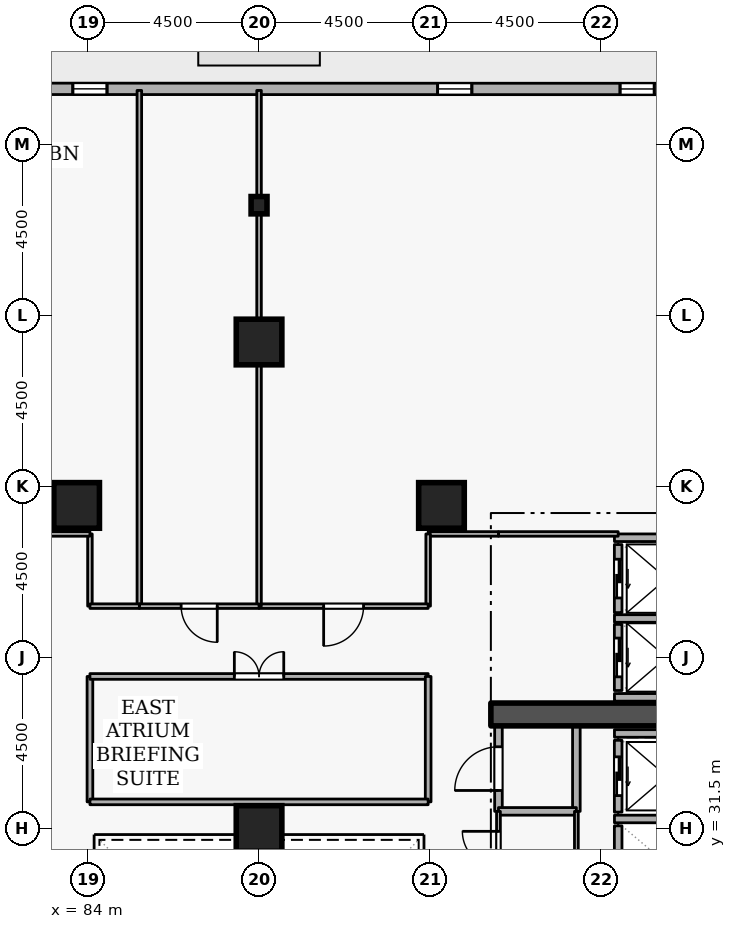
"""IFC4 building model, lengths in metres.
Left out: names, types, materials, properties, quantities, classifications, styles, units other than length and angle.
Written with IfcOpenShell. Run it as: python <this file> out.ifc"""

import sys

from ifc_helpers import new_model, si_unit, direction, frame, frame_2d, origin, origin_2d, place, context, subcontext, project, spatial, rectangle, i_section, extrude, element, fill, save


model = new_model("IFC4")
c1 = context("Model", 3, precision=1e-05, world=origin(), true_north=direction((0.0, 1.0)))
c2 = subcontext(c1, "Body", "Model", "MODEL_VIEW")
j1 = project(units=[si_unit("LENGTHUNIT", "METRE"), si_unit("PLANEANGLEUNIT", "RADIAN")], contexts=[c1])
p1 = place(None, origin())
s1 = spatial("IfcSite", under=j1, at=p1, CompositionType="ELEMENT")
p2 = place(p1, origin())
s2 = spatial("IfcBuilding", under=s1, at=p2, CompositionType="ELEMENT")
p3 = place(p2, frame((0.0, 0.0, 90.9)))
s3 = spatial("IfcBuildingStorey", under=s2, at=p3, CompositionType="ELEMENT", Elevation=90.9)
p4 = place(p3, frame((94.6, 34.5, 0.0), z_axis=(0.0, 0.0, 1.0), x_axis=(1.0, 0.0, 0.0)))
e1 = element("IfcWall", 1, at=p4, inside=s3, PredefinedType="SHEAR", context=c2, shape_type="SweptSolid", body=[
    extrude(rectangle(XDim=5.7, YDim=0.6, at=frame_2d((2.85, 0.0))), origin(), (0.0, 0.0, 1.0), 3.6),
])
for number, where, z_axis, x_axis in (
    (2, (88.5, 44.3, 0.0), (0.0, 0.0, 1.0), (1.0, 0.0, 0.0)),
    (3, (93.3, 40.0, 0.0), (0.0, 0.0, 1.0), (1.0, 0.0, 0.0)),
    (4, (83.7, 40.0, 0.0), (0.0, 0.0, 1.0), (1.0, 0.0, 0.0)),
    (5, (88.5, 31.5, 0.0), (0.0, 0.0, 1.0), (1.0, 0.0, 0.0)),
):
    element("IfcColumn", number, at=place(p3, frame(where, z_axis=z_axis, x_axis=x_axis)), inside=s3, PredefinedType="COLUMN", context=c2, shape_type="SweptSolid", body=[
        extrude(rectangle(XDim=1.2, YDim=1.2, at=origin_2d()), origin(), (0.0, 0.0, 1.0), 3.6),
    ])
p5 = place(p3, frame((88.5, 47.9, 0.0), z_axis=(0.0, 0.0, 1.0), x_axis=(1.0, 0.0, 0.0)))
e6 = element("IfcColumn", 6, at=p5, inside=s3, PredefinedType="COLUMN", context=c2, shape_type="SweptSolid", body=[
    extrude(i_section(OverallWidth=0.418, OverallDepth=0.456, WebThickness=0.042, FlangeThickness=0.067, FilletRadius=0.015, at=origin_2d()), origin(), (0.0, 0.0, 1.0), 3.6),
])
p6 = place(p3, frame((101.599, 50.957, 0.0), z_axis=(0.0, 0.0, 1.0), x_axis=(-0.99999997744, 0.000212414941, 0.0)))
e7 = element("IfcWall", 7, at=p6, inside=s3, PredefinedType="STANDARD", context=c2, shape_type="SweptSolid", body=[
    extrude(rectangle(XDim=34.481, YDim=0.3, at=frame_2d((17.24, 0.0))), origin(), (0.0, 0.0, 1.0), 2.7),
])
p7 = place(p6, frame((19.04, 0.0, 0.0)))
e8 = element("IfcOpeningElement", 8, at=p7, cuts=e7, PredefinedType="OPENING", context=c2, shape_type="SweptSolid", body=[
    extrude(rectangle(XDim=1.0, YDim=2.08, at=frame_2d((0.5, 1.04))), frame((0.0, 0.16, 0.0), z_axis=(0.0, -1.0, 0.0), x_axis=(1.0, 0.0, 0.0)), (0.0, 0.0, 1.0), 0.32),
])
p8 = place(p6, frame((2.7, 0.0, 0.72)))
e9 = element("IfcOpeningElement", 9, at=p8, cuts=e7, PredefinedType="OPENING", context=c2, shape_type="SweptSolid", body=[
    extrude(rectangle(XDim=0.9, YDim=1.75, at=frame_2d((0.45, 0.875))), frame((0.0, 0.16, 0.0), z_axis=(0.0, -1.0, 0.0), x_axis=(1.0, 0.0, 0.0)), (0.0, 0.0, 1.0), 0.32),
])
p9 = place(p6, frame((7.5, 0.0, 0.72)))
e10 = element("IfcOpeningElement", 10, at=p9, cuts=e7, PredefinedType="OPENING", context=c2, shape_type="SweptSolid", body=[
    extrude(rectangle(XDim=0.9, YDim=1.75, at=frame_2d((0.45, 0.875))), frame((0.0, 0.16, 0.0), z_axis=(0.0, -1.0, 0.0), x_axis=(1.0, 0.0, 0.0)), (0.0, 0.0, 1.0), 0.32),
])
p10 = place(p6, frame((17.1, 0.0, 0.72)))
e11 = element("IfcOpeningElement", 11, at=p10, cuts=e7, PredefinedType="OPENING", context=c2, shape_type="SweptSolid", body=[
    extrude(rectangle(XDim=0.9, YDim=1.75, at=frame_2d((0.45, 0.875))), frame((0.0, 0.16, 0.0), z_axis=(0.0, -1.0, 0.0), x_axis=(1.0, 0.0, 0.0)), (0.0, 0.0, 1.0), 0.32),
])
p11 = place(p6, frame((21.9, 0.0, 0.72)))
e12 = element("IfcOpeningElement", 12, at=p11, cuts=e7, PredefinedType="OPENING", context=c2, shape_type="SweptSolid", body=[
    extrude(rectangle(XDim=0.9, YDim=1.75, at=frame_2d((0.45, 0.875))), frame((0.0, 0.16, 0.0), z_axis=(0.0, -1.0, 0.0), x_axis=(1.0, 0.0, 0.0)), (0.0, 0.0, 1.0), 0.32),
])
p12 = place(p6, frame((26.7, 0.0, 0.72)))
e13 = element("IfcOpeningElement", 13, at=p12, cuts=e7, PredefinedType="OPENING", context=c2, shape_type="SweptSolid", body=[
    extrude(rectangle(XDim=0.9, YDim=1.75, at=frame_2d((0.45, 0.875))), frame((0.0, 0.16, 0.0), z_axis=(0.0, -1.0, 0.0), x_axis=(1.0, 0.0, 0.0)), (0.0, 0.0, 1.0), 0.32),
])
p13 = place(p6, frame((31.5, 0.0, 0.72)))
e14 = element("IfcOpeningElement", 14, at=p13, cuts=e7, PredefinedType="OPENING", context=c2, shape_type="SweptSolid", body=[
    extrude(rectangle(XDim=0.9, YDim=1.75, at=frame_2d((0.45, 0.875))), frame((0.0, 0.16, 0.0), z_axis=(0.0, -1.0, 0.0), x_axis=(1.0, 0.0, 0.0)), (0.0, 0.0, 1.0), 0.32),
])
p14 = place(p3, frame((97.95, 31.57, 0.0), z_axis=(0.0, 0.0, 1.0), x_axis=(0.0, -1.0, 0.0)))
e15 = element("IfcWall", 15, at=p14, inside=s3, PredefinedType="STANDARD", context=c2, shape_type="SweptSolid", body=[
    extrude(rectangle(XDim=1.99, YDim=0.2, at=frame_2d((0.995, 0.0))), origin(), (0.0, 0.0, 1.0), 3.34),
])
p15 = place(p3, frame((97.95, 33.82, 0.0), z_axis=(0.0, 0.0, 1.0), x_axis=(0.0, -1.0, 0.0)))
e16 = element("IfcWall", 16, at=p15, inside=s3, PredefinedType="STANDARD", context=c2, shape_type="SweptSolid", body=[
    extrude(rectangle(XDim=1.89, YDim=0.2, at=frame_2d((0.945, 0.0))), origin(), (0.0, 0.0, 1.0), 3.34),
])
p16 = place(p15, frame((0.435, 0.0, 0.0)))
e17 = element("IfcOpeningElement", 17, at=p16, cuts=e16, PredefinedType="OPENING", context=c2, shape_type="SweptSolid", body=[
    extrude(rectangle(XDim=1.02, YDim=2.06, at=frame_2d((0.51, 1.03))), frame((0.0, 0.11, 0.0), z_axis=(0.0, -1.0, 0.0), x_axis=(1.0, 0.0, 0.0)), (0.0, 0.0, 1.0), 0.22),
])
p17 = place(p3, frame((97.95, 36.87, 0.0), z_axis=(0.0, 0.0, 1.0), x_axis=(0.0, -1.0, 0.0)))
e18 = element("IfcWall", 18, at=p17, inside=s3, PredefinedType="STANDARD", context=c2, shape_type="SweptSolid", body=[
    extrude(rectangle(XDim=1.74, YDim=0.2, at=frame_2d((0.87, 0.0))), origin(), (0.0, 0.0, 1.0), 3.34),
])
p18 = place(p17, frame((0.36, 0.0, 0.0)))
e19 = element("IfcOpeningElement", 19, at=p18, cuts=e18, PredefinedType="OPENING", context=c2, shape_type="SweptSolid", body=[
    extrude(rectangle(XDim=1.02, YDim=2.06, at=frame_2d((0.51, 1.03))), frame((0.0, 0.11, 0.0), z_axis=(0.0, -1.0, 0.0), x_axis=(1.0, 0.0, 0.0)), (0.0, 0.0, 1.0), 0.22),
])
p19 = place(p3, frame((97.95, 38.97, 0.0), z_axis=(0.0, 0.0, 1.0), x_axis=(0.0, -1.0, 0.0)))
e20 = element("IfcWall", 20, at=p19, inside=s3, PredefinedType="STANDARD", context=c2, shape_type="SweptSolid", body=[
    extrude(rectangle(XDim=1.79, YDim=0.2, at=frame_2d((0.895, 0.0))), origin(), (0.0, 0.0, 1.0), 3.34),
])
p20 = place(p19, frame((0.385, 0.0, 0.0)))
e21 = element("IfcOpeningElement", 21, at=p20, cuts=e20, PredefinedType="OPENING", context=c2, shape_type="SweptSolid", body=[
    extrude(rectangle(XDim=1.02, YDim=2.06, at=frame_2d((0.51, 1.03))), frame((0.0, 0.11, 0.0), z_axis=(0.0, -1.0, 0.0), x_axis=(1.0, 0.0, 0.0)), (0.0, 0.0, 1.0), 0.22),
])
for number, where, z_axis, x_axis in (
    (22, (97.852, 31.75, 0.0), (0.0, 0.0, 1.0), (1.0, 0.0, 0.0)),
    (23, (97.852, 34.0, 0.0), (0.0, 0.0, 1.0), (1.0, 0.0, 0.0)),
):
    element("IfcWall", number, at=place(p3, frame(where, z_axis=z_axis, x_axis=x_axis)), inside=s3, PredefinedType="STANDARD", context=c2, shape_type="SweptSolid", body=[
        extrude(rectangle(XDim=2.436, YDim=0.2, at=frame_2d((1.218, 0.0))), origin(), (0.0, 0.0, 1.0), 3.34),
    ])
for number, where, z_axis, x_axis in (
    (24, (97.852, 37.025, 0.0), (0.0, 0.0, 1.0), (1.0, 0.0, 0.0)),
    (25, (97.852, 34.95, 0.0), (0.0, 0.0, 1.0), (1.0, 0.0, 0.0)),
):
    element("IfcWall", number, at=place(p3, frame(where, z_axis=z_axis, x_axis=x_axis)), inside=s3, PredefinedType="STANDARD", context=c2, shape_type="SweptSolid", body=[
        extrude(rectangle(XDim=2.746, YDim=0.2, at=frame_2d((1.373, 0.0))), origin(), (0.0, 0.0, 1.0), 3.34),
    ])
p21 = place(p3, frame((97.852, 39.15, 0.0), z_axis=(0.0, 0.0, 1.0), x_axis=(1.0, 0.0, 0.0)))
e26 = element("IfcWall", 26, at=p21, inside=s3, PredefinedType="STANDARD", context=c2, shape_type="SweptSolid", body=[
    extrude(rectangle(XDim=2.636, YDim=0.2, at=frame_2d((1.318, 0.0))), origin(), (0.0, 0.0, 1.0), 3.34),
])
p22 = place(p3, frame((94.8, 31.95, 0.0), z_axis=(0.0, 0.0, 1.0), x_axis=(0.0, 1.0, 0.0)))
e27 = element("IfcWall", 27, at=p22, inside=s3, PredefinedType="STANDARD", context=c2, shape_type="SweptSolid", body=[
    extrude(rectangle(XDim=2.25, YDim=0.2, at=frame_2d((1.125, 0.0))), origin(), (0.0, 0.0, 1.0), 3.34),
])
p23 = place(p22, frame((0.55, 0.0, 0.0)))
e28 = element("IfcOpeningElement", 28, at=p23, cuts=e27, PredefinedType="OPENING", context=c2, shape_type="SweptSolid", body=[
    extrude(rectangle(XDim=1.15, YDim=2.1, at=frame_2d((0.575, 1.05))), frame((0.0, 0.11, 0.0), z_axis=(0.0, -1.0, 0.0), x_axis=(1.0, 0.0, 0.0)), (0.0, 0.0, 1.0), 0.22),
])
p24 = place(p3, frame((96.85, 34.2, 0.0), z_axis=(0.0, 0.0, 1.0), x_axis=(0.0, -1.0, 0.0)))
e29 = element("IfcWall", 29, at=p24, inside=s3, PredefinedType="STANDARD", context=c2, shape_type="SweptSolid", body=[
    extrude(rectangle(XDim=2.25, YDim=0.2, at=frame_2d((1.125, 0.0))), origin(), (0.0, 0.0, 1.0), 3.34),
])
p25 = place(p3, frame((96.85, 31.95, 0.0), z_axis=(0.0, 0.0, 1.0), x_axis=(-1.0, 0.0, 0.0)))
e30 = element("IfcWall", 30, at=p25, inside=s3, PredefinedType="STANDARD", context=c2, shape_type="SweptSolid", body=[
    extrude(rectangle(XDim=2.05, YDim=0.2, at=frame_2d((1.025, 0.0))), origin(), (0.0, 0.0, 1.0), 3.34),
])
p26 = place(p3, frame((94.8, 29.95, 0.0), z_axis=(0.0, 0.0, 1.0), x_axis=(0.0, 1.0, 0.0)))
e31 = element("IfcWall", 31, at=p26, inside=s3, PredefinedType="PARTITIONING", context=c2, shape_type="SweptSolid", body=[
    extrude(rectangle(XDim=2.0, YDim=0.1, at=frame_2d((1.0, 0.0))), origin(), (0.0, 0.0, 1.0), 3.34),
])
p27 = place(p26, frame((0.525, 0.0, 0.0)))
e32 = element("IfcOpeningElement", 32, at=p27, cuts=e31, PredefinedType="OPENING", context=c2, shape_type="SweptSolid", body=[
    extrude(rectangle(XDim=0.95, YDim=2.1, at=frame_2d((0.475, 1.05))), frame((0.0, 0.06, 0.0), z_axis=(0.0, -1.0, 0.0), x_axis=(1.0, 0.0, 0.0)), (0.0, 0.0, 1.0), 0.12),
])
p28 = place(p3, frame((96.85, 31.95, 0.0), z_axis=(0.0, 0.0, 1.0), x_axis=(0.0, -1.0, 0.0)))
e33 = element("IfcWall", 33, at=p28, inside=s3, PredefinedType="PARTITIONING", context=c2, shape_type="SweptSolid", body=[
    extrude(rectangle(XDim=2.0, YDim=0.1, at=frame_2d((1.0, 0.0))), origin(), (0.0, 0.0, 1.0), 3.34),
])
p29 = place(p3, frame((97.95, 39.25, 0.0), z_axis=(0.0, 0.0, 1.0), x_axis=(-1.0, 0.0, 0.0)))
e34 = element("IfcWall", 34, at=p29, inside=s3, PredefinedType="PARTITIONING", context=c2, shape_type="SweptSolid", body=[
    extrude(rectangle(XDim=3.15, YDim=0.12, at=frame_2d((1.575, 0.0))), origin(), (0.0, 0.0, 1.0), 3.34),
])
p30 = place(p3, frame((94.8, 39.25, 0.0), z_axis=(0.0, 0.0, 1.0), x_axis=(-1.0, 0.0, 0.0)))
e35 = element("IfcWall", 35, at=p30, inside=s3, PredefinedType="PARTITIONING", context=c2, shape_type="SweptSolid", body=[
    extrude(rectangle(XDim=1.85, YDim=0.12, at=frame_2d((0.925, 0.0))), origin(), (0.0, 0.0, 1.0), 3.34),
])
p31 = place(p3, frame((92.95, 39.25, 0.0), z_axis=(0.0, 0.0, 1.0), x_axis=(0.0, -1.0, 0.0)))
e36 = element("IfcWall", 36, at=p31, inside=s3, PredefinedType="PARTITIONING", context=c2, shape_type="SweptSolid", body=[
    extrude(rectangle(XDim=1.9, YDim=0.12, at=frame_2d((0.95, 0.0))), origin(), (0.0, 0.0, 1.0), 3.34),
])
p32 = place(p3, frame((92.95, 37.35, 0.0), z_axis=(0.0, 0.0, 1.0), x_axis=(-1.0, 0.0, 0.0)))
e37 = element("IfcWall", 37, at=p32, inside=s3, PredefinedType="PARTITIONING", context=c2, shape_type="SweptSolid", body=[
    extrude(rectangle(XDim=4.45, YDim=0.12, at=frame_2d((2.225, 0.0))), origin(), (0.0, 0.0, 1.0), 3.34),
])
p33 = place(p32, frame((1.7, 0.0, 0.0)))
e38 = element("IfcOpeningElement", 38, at=p33, cuts=e37, PredefinedType="OPENING", context=c2, shape_type="SweptSolid", body=[
    extrude(rectangle(XDim=1.05, YDim=2.1, at=frame_2d((0.525, 1.05))), frame((0.0, 0.07, 0.0), z_axis=(0.0, -1.0, 0.0), x_axis=(1.0, 0.0, 0.0)), (0.0, 0.0, 1.0), 0.14),
])
p34 = place(p3, frame((88.5, 37.35, 0.0), z_axis=(0.0, 0.0, 1.0), x_axis=(0.0, 1.0, 0.0)))
e39 = element("IfcWall", 39, at=p34, inside=s3, PredefinedType="PARTITIONING", context=c2, shape_type="SweptSolid", body=[
    extrude(rectangle(XDim=13.57, YDim=0.12, at=frame_2d((6.785, 0.0))), origin(), (0.0, 0.0, 1.0), 2.932),
])
p35 = place(p3, frame((85.35, 37.35, 0.0), z_axis=(0.0, 0.0, 1.0), x_axis=(0.0, 1.0, 0.0)))
e40 = element("IfcWall", 40, at=p35, inside=s3, PredefinedType="PARTITIONING", context=c2, shape_type="SweptSolid", body=[
    extrude(rectangle(XDim=13.57, YDim=0.12, at=frame_2d((6.785, 0.0))), origin(), (0.0, 0.0, 1.0), 3.34),
])
p36 = place(p3, frame((88.5, 37.35, 0.0), z_axis=(0.0, 0.0, 1.0), x_axis=(-1.0, 0.0, 0.0)))
e41 = element("IfcWall", 41, at=p36, inside=s3, PredefinedType="PARTITIONING", context=c2, shape_type="SweptSolid", body=[
    extrude(rectangle(XDim=3.15, YDim=0.12, at=frame_2d((1.575, 0.0))), origin(), (0.0, 0.0, 1.0), 3.34),
])
p37 = place(p36, frame((1.1, 0.0, 0.0)))
e42 = element("IfcOpeningElement", 42, at=p37, cuts=e41, PredefinedType="OPENING", context=c2, shape_type="SweptSolid", body=[
    extrude(rectangle(XDim=0.95, YDim=2.1, at=frame_2d((0.475, 1.05))), frame((0.0, 0.07, 0.0), z_axis=(0.0, -1.0, 0.0), x_axis=(1.0, 0.0, 0.0)), (0.0, 0.0, 1.0), 0.14),
])
p38 = place(p3, frame((84.05, 37.35, 0.0), z_axis=(0.0, 0.0, 1.0), x_axis=(0.0, 1.0, 0.0)))
e43 = element("IfcWall", 43, at=p38, inside=s3, PredefinedType="PARTITIONING", context=c2, shape_type="SweptSolid", body=[
    extrude(rectangle(XDim=1.9, YDim=0.12, at=frame_2d((0.95, 0.0))), origin(), (0.0, 0.0, 1.0), 3.34),
])
p39 = place(p3, frame((84.05, 39.25, 0.0), z_axis=(0.0, 0.0, 1.0), x_axis=(-1.0, 0.0, 0.0)))
e44 = element("IfcWall", 44, at=p39, inside=s3, PredefinedType="PARTITIONING", context=c2, shape_type="SweptSolid", body=[
    extrude(rectangle(XDim=1.85, YDim=0.12, at=frame_2d((0.925, 0.0))), origin(), (0.0, 0.0, 1.0), 3.34),
])
p40 = place(p3, frame((85.35, 37.35, 0.0), z_axis=(0.0, 0.0, 1.0), x_axis=(-1.0, 0.0, 0.0)))
e45 = element("IfcWall", 45, at=p40, inside=s3, PredefinedType="PARTITIONING", context=c2, shape_type="SweptSolid", body=[
    extrude(rectangle(XDim=1.3, YDim=0.12, at=frame_2d((0.65, 0.0))), origin(), (0.0, 0.0, 1.0), 3.34),
])
p41 = place(p3, frame((84.05, 32.2, 0.0), z_axis=(0.0, 0.0, 1.0), x_axis=(0.0, 1.0, 0.0)))
e46 = element("IfcWall", 46, at=p41, inside=s3, PredefinedType="PARTITIONING", context=c2, shape_type="SweptSolid", body=[
    extrude(rectangle(XDim=3.3, YDim=0.15, at=frame_2d((1.65, 0.0))), origin(), (0.0, 0.0, 1.0), 3.34),
])
p42 = place(p3, frame((84.05, 35.5, 0.0), z_axis=(0.0, 0.0, 1.0), x_axis=(1.0, 0.0, 0.0)))
e47 = element("IfcWall", 47, at=p42, inside=s3, PredefinedType="PARTITIONING", context=c2, shape_type="SweptSolid", body=[
    extrude(rectangle(XDim=8.9, YDim=0.15, at=frame_2d((4.45, 0.0))), origin(), (0.0, 0.0, 1.0), 3.34),
])
p43 = place(p42, frame((3.8, 0.0, 0.0)))
e48 = element("IfcOpeningElement", 48, at=p43, cuts=e47, PredefinedType="OPENING", context=c2, shape_type="SweptSolid", body=[
    extrude(rectangle(XDim=1.3, YDim=2.12, at=frame_2d((0.65, 1.06))), frame((0.0, 0.085, 0.0), z_axis=(0.0, -1.0, 0.0), x_axis=(1.0, 0.0, 0.0)), (0.0, 0.0, 1.0), 0.17),
])
p44 = place(p3, frame((92.95, 35.5, 0.0), z_axis=(0.0, 0.0, 1.0), x_axis=(0.0, -1.0, 0.0)))
e49 = element("IfcWall", 49, at=p44, inside=s3, PredefinedType="PARTITIONING", context=c2, shape_type="SweptSolid", body=[
    extrude(rectangle(XDim=3.3, YDim=0.15, at=frame_2d((1.65, 0.0))), origin(), (0.0, 0.0, 1.0), 3.34),
])
p45 = place(p3, frame((92.95, 32.2, 0.0), z_axis=(0.0, 0.0, 1.0), x_axis=(-1.0, 0.0, 0.0)))
e50 = element("IfcWall", 50, at=p45, inside=s3, PredefinedType="PARTITIONING", context=c2, shape_type="SweptSolid", body=[
    extrude(rectangle(XDim=8.9, YDim=0.15, at=frame_2d((4.45, 0.0))), origin(), (0.0, 0.0, 1.0), 3.34),
])
p46 = place(p8, origin())
e51 = element("IfcWindow", 51, at=p46, inside=s3, PartitioningType="SINGLE_PANEL", PredefinedType="WINDOW", context=c2, shape_type="SweptSolid", body=[
    extrude(rectangle(XDim=0.9, YDim=1.75, at=frame_2d((0.45, 0.875))), frame((0.0, 0.03, 0.0), z_axis=(0.0, -1.0, 0.0), x_axis=(1.0, 0.0, 0.0)), (0.0, 0.0, 1.0), 0.06),
])
fill(e9, e51)
p47 = place(p9, origin())
e52 = element("IfcWindow", 52, at=p47, inside=s3, PartitioningType="SINGLE_PANEL", PredefinedType="WINDOW", context=c2, shape_type="SweptSolid", body=[
    extrude(rectangle(XDim=0.9, YDim=1.75, at=frame_2d((0.45, 0.875))), frame((0.0, 0.03, 0.0), z_axis=(0.0, -1.0, 0.0), x_axis=(1.0, 0.0, 0.0)), (0.0, 0.0, 1.0), 0.06),
])
fill(e10, e52)
p48 = place(p10, origin())
e53 = element("IfcWindow", 53, at=p48, inside=s3, PartitioningType="SINGLE_PANEL", PredefinedType="WINDOW", context=c2, shape_type="SweptSolid", body=[
    extrude(rectangle(XDim=0.9, YDim=1.75, at=frame_2d((0.45, 0.875))), frame((0.0, 0.03, 0.0), z_axis=(0.0, -1.0, 0.0), x_axis=(1.0, 0.0, 0.0)), (0.0, 0.0, 1.0), 0.06),
])
fill(e11, e53)
p49 = place(p16, origin())
e54 = element("IfcDoor", 54, at=p49, inside=s3, OperationType="SLIDING_TO_LEFT", PredefinedType="DOOR", context=c2, shape_type="SweptSolid", body=[
    extrude(rectangle(XDim=1.02, YDim=2.06, at=frame_2d((0.51, 1.03))), frame((0.0, 0.025, 0.0), z_axis=(0.0, -1.0, 0.0), x_axis=(1.0, 0.0, 0.0)), (0.0, 0.0, 1.0), 0.05),
])
fill(e17, e54)
p50 = place(p18, origin())
e55 = element("IfcDoor", 55, at=p50, inside=s3, OperationType="SLIDING_TO_LEFT", PredefinedType="DOOR", context=c2, shape_type="SweptSolid", body=[
    extrude(rectangle(XDim=1.02, YDim=2.06, at=frame_2d((0.51, 1.03))), frame((0.0, 0.025, 0.0), z_axis=(0.0, -1.0, 0.0), x_axis=(1.0, 0.0, 0.0)), (0.0, 0.0, 1.0), 0.05),
])
fill(e19, e55)
p51 = place(p20, origin())
e56 = element("IfcDoor", 56, at=p51, inside=s3, OperationType="SLIDING_TO_LEFT", PredefinedType="DOOR", context=c2, shape_type="SweptSolid", body=[
    extrude(rectangle(XDim=1.02, YDim=2.06, at=frame_2d((0.51, 1.03))), frame((0.0, 0.025, 0.0), z_axis=(0.0, -1.0, 0.0), x_axis=(1.0, 0.0, 0.0)), (0.0, 0.0, 1.0), 0.05),
])
fill(e21, e56)
p52 = place(p27, origin())
e57 = element("IfcDoor", 57, at=p52, inside=s3, OperationType="SINGLE_SWING_RIGHT", PredefinedType="DOOR", context=c2, shape_type="SweptSolid", body=[
    extrude(rectangle(XDim=0.95, YDim=2.1, at=frame_2d((0.475, 1.05))), frame((0.0, 0.025, 0.0), z_axis=(0.0, -1.0, 0.0), x_axis=(1.0, 0.0, 0.0)), (0.0, 0.0, 1.0), 0.05),
])
fill(e32, e57)
p53 = place(p23, origin())
e58 = element("IfcDoor", 58, at=p53, inside=s3, OperationType="SINGLE_SWING_LEFT", PredefinedType="DOOR", context=c2, shape_type="SweptSolid", body=[
    extrude(rectangle(XDim=1.15, YDim=2.1, at=frame_2d((0.575, 1.05))), frame((0.0, 0.025, 0.0), z_axis=(0.0, -1.0, 0.0), x_axis=(1.0, 0.0, 0.0)), (0.0, 0.0, 1.0), 0.05),
])
fill(e28, e58)
p54 = place(p33, origin())
e59 = element("IfcDoor", 59, at=p54, inside=s3, OperationType="SINGLE_SWING_RIGHT", PredefinedType="DOOR", context=c2, shape_type="SweptSolid", body=[
    extrude(rectangle(XDim=1.05, YDim=2.1, at=frame_2d((0.525, 1.05))), frame((0.0, 0.025, 0.0), z_axis=(0.0, -1.0, 0.0), x_axis=(1.0, 0.0, 0.0)), (0.0, 0.0, 1.0), 0.05),
])
fill(e38, e59)
p55 = place(p37, origin())
e60 = element("IfcDoor", 60, at=p55, inside=s3, OperationType="SINGLE_SWING_LEFT", PredefinedType="DOOR", context=c2, shape_type="SweptSolid", body=[
    extrude(rectangle(XDim=0.95, YDim=2.1, at=frame_2d((0.475, 1.05))), frame((0.0, 0.025, 0.0), z_axis=(0.0, -1.0, 0.0), x_axis=(1.0, 0.0, 0.0)), (0.0, 0.0, 1.0), 0.05),
])
fill(e42, e60)
p56 = place(p43, origin())
e61 = element("IfcDoor", 61, at=p56, inside=s3, OperationType="DOUBLE_DOOR_SINGLE_SWING", PredefinedType="DOOR", context=c2, shape_type="SweptSolid", body=[
    extrude(rectangle(XDim=1.3, YDim=2.12, at=frame_2d((0.65, 1.06))), frame((0.0, 0.025, 0.0), z_axis=(0.0, -1.0, 0.0), x_axis=(1.0, 0.0, 0.0)), (0.0, 0.0, 1.0), 0.05),
])
fill(e48, e61)
save(model, sys.argv[1])
